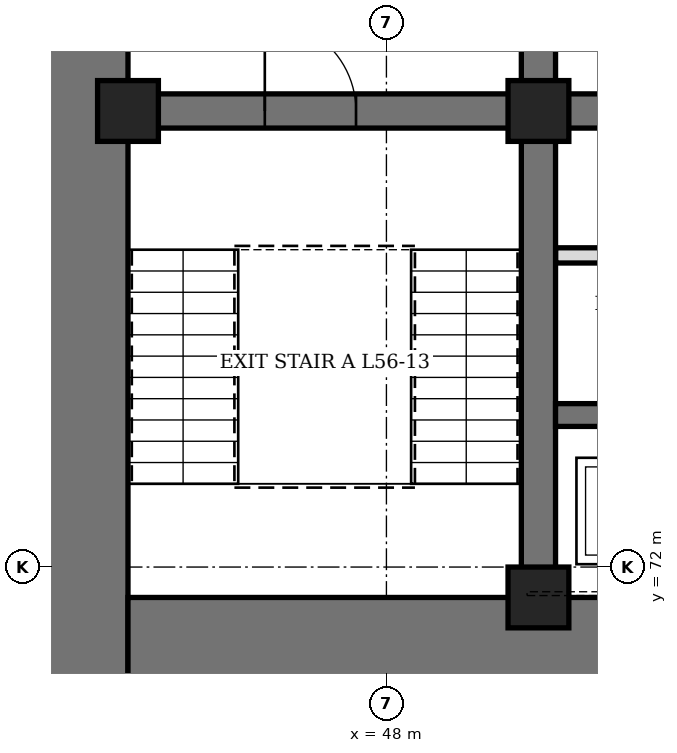
"""IFC4 building model, lengths in metres.
Left out: names, types, materials, properties, quantities, classifications, styles, units other than length and angle.
Written with IfcOpenShell. Run it as: python <this file> out.ifc"""

import sys

from ifc_helpers import new_model, si_unit, direction, frame, frame_2d, origin, origin_2d, place, context, subcontext, project, spatial, rectangle, hollow_rectangle, extrude, element, fill, save


model = new_model("IFC4")
c1 = context("Model", 3, precision=1e-05, world=origin(), true_north=direction((0.0, 1.0)))
c2 = subcontext(c1, "Body", "Model", "MODEL_VIEW")
j1 = project(units=[si_unit("LENGTHUNIT", "METRE"), si_unit("PLANEANGLEUNIT", "RADIAN")], contexts=[c1])
p1 = place(None, origin())
s1 = spatial("IfcSite", under=j1, at=p1, CompositionType="ELEMENT")
p2 = place(p1, origin())
s2 = spatial("IfcBuilding", under=s1, at=p2, CompositionType="ELEMENT")
p3 = place(p2, frame((0.0, 0.0, 250.3)))
s3 = spatial("IfcBuildingStorey", under=s2, at=p3, CompositionType="ELEMENT", Elevation=250.3)
p4 = place(p3, frame((44.0, 70.4, 0.0), z_axis=(0.0, 0.0, 1.0), x_axis=(0.0, 1.0, 0.0)))
e1 = element("IfcWall", 1, at=p4, inside=s3, PredefinedType="SHEAR", context=c2, shape_type="SweptSolid", body=[
    extrude(rectangle(XDim=19.2, YDim=1.2, at=frame_2d((9.6, 0.0))), origin(), (0.0, 0.0, 1.0), 4.2),
])
p5 = place(p4, frame((8.6, 0.0, 0.0)))
e2 = element("IfcOpeningElement", 2, at=p5, cuts=e1, PredefinedType="OPENING", context=c2, shape_type="SweptSolid", body=[
    extrude(rectangle(XDim=2.0, YDim=2.4, at=frame_2d((1.0, 1.2))), frame((0.0, 0.61, 0.0), z_axis=(0.0, -1.0, 0.0), x_axis=(1.0, 0.0, 0.0)), (0.0, 0.0, 1.0), 1.22),
])
p6 = place(p3, frame((44.6, 71.0, 0.0), z_axis=(0.0, 0.0, 1.0), x_axis=(1.0, 0.0, 0.0)))
e3 = element("IfcWall", 3, at=p6, inside=s3, PredefinedType="SHEAR", context=c2, shape_type="SweptSolid", body=[
    extrude(rectangle(XDim=22.8, YDim=1.2, at=frame_2d((11.4, 0.0))), origin(), (0.0, 0.0, 1.0), 4.2),
])
p7 = place(p6, frame((6.35, 0.0, 0.0)))
e4 = element("IfcOpeningElement", 4, at=p7, cuts=e3, PredefinedType="OPENING", context=c2, shape_type="SweptSolid", body=[
    extrude(rectangle(XDim=1.1, YDim=2.2, at=frame_2d((0.55, 1.1))), frame((0.0, 0.61, 0.0), z_axis=(0.0, -1.0, 0.0), x_axis=(1.0, 0.0, 0.0)), (0.0, 0.0, 1.0), 1.22),
])
p8 = place(p6, frame((9.35, 0.0, 0.0)))
e5 = element("IfcOpeningElement", 5, at=p8, cuts=e3, PredefinedType="OPENING", context=c2, shape_type="SweptSolid", body=[
    extrude(rectangle(XDim=1.1, YDim=2.2, at=frame_2d((0.55, 1.1))), frame((0.0, 0.61, 0.0), z_axis=(0.0, -1.0, 0.0), x_axis=(1.0, 0.0, 0.0)), (0.0, 0.0, 1.0), 1.22),
])
p9 = place(p6, frame((12.35, 0.0, 0.0)))
e6 = element("IfcOpeningElement", 6, at=p9, cuts=e3, PredefinedType="OPENING", context=c2, shape_type="SweptSolid", body=[
    extrude(rectangle(XDim=1.1, YDim=2.2, at=frame_2d((0.55, 1.1))), frame((0.0, 0.61, 0.0), z_axis=(0.0, -1.0, 0.0), x_axis=(1.0, 0.0, 0.0)), (0.0, 0.0, 1.0), 1.22),
])
p10 = place(p6, frame((15.35, 0.0, 0.0)))
e7 = element("IfcOpeningElement", 7, at=p10, cuts=e3, PredefinedType="OPENING", context=c2, shape_type="SweptSolid", body=[
    extrude(rectangle(XDim=1.1, YDim=2.2, at=frame_2d((0.55, 1.1))), frame((0.0, 0.61, 0.0), z_axis=(0.0, -1.0, 0.0), x_axis=(1.0, 0.0, 0.0)), (0.0, 0.0, 1.0), 1.22),
])
p11 = place(p3, frame((50.0, 71.6, 0.0), z_axis=(0.0, 0.0, 1.0), x_axis=(0.0, 1.0, 0.0)))
e8 = element("IfcWall", 8, at=p11, inside=s3, PredefinedType="SHEAR", context=c2, shape_type="SweptSolid", body=[
    extrude(rectangle(XDim=16.8, YDim=0.45, at=frame_2d((8.4, 0.0))), origin(), (0.0, 0.0, 1.0), 4.2),
])
p12 = place(p11, frame((7.5, 0.0, 0.0)))
e9 = element("IfcOpeningElement", 9, at=p12, cuts=e8, PredefinedType="OPENING", context=c2, shape_type="SweptSolid", body=[
    extrude(rectangle(XDim=1.8, YDim=2.4, at=frame_2d((0.9, 1.2))), frame((0.0, 0.235, 0.0), z_axis=(0.0, -1.0, 0.0), x_axis=(1.0, 0.0, 0.0)), (0.0, 0.0, 1.0), 0.47),
])
p13 = place(p3, frame((44.6, 78.0, 0.0), z_axis=(0.0, 0.0, 1.0), x_axis=(1.0, 0.0, 0.0)))
e10 = element("IfcWall", 10, at=p13, inside=s3, PredefinedType="SHEAR", context=c2, shape_type="SweptSolid", body=[
    extrude(rectangle(XDim=5.175, YDim=0.45, at=frame_2d((2.587, 0.0))), origin(), (0.0, 0.0, 1.0), 4.2),
])
p14 = place(p13, frame((1.8, 0.0, 0.0)))
e11 = element("IfcOpeningElement", 11, at=p14, cuts=e10, PredefinedType="OPENING", context=c2, shape_type="SweptSolid", body=[
    extrude(rectangle(XDim=1.2, YDim=2.1, at=frame_2d((0.6, 1.05))), frame((0.0, 0.235, 0.0), z_axis=(0.0, -1.0, 0.0), x_axis=(1.0, 0.0, 0.0)), (0.0, 0.0, 1.0), 0.47),
])
p15 = place(p3, frame((50.225, 78.0, 0.0), z_axis=(0.0, 0.0, 1.0), x_axis=(1.0, 0.0, 0.0)))
e12 = element("IfcWall", 12, at=p15, inside=s3, PredefinedType="SHEAR", context=c2, shape_type="SweptSolid", body=[
    extrude(rectangle(XDim=11.55, YDim=0.45, at=frame_2d((5.775, 0.0))), origin(), (0.0, 0.0, 1.0), 4.2),
])
p16 = place(p15, frame((0.825, 0.0, 0.0)))
e13 = element("IfcOpeningElement", 13, at=p16, cuts=e12, PredefinedType="OPENING", context=c2, shape_type="SweptSolid", body=[
    extrude(rectangle(XDim=0.9, YDim=2.1, at=frame_2d((0.45, 1.05))), frame((0.0, 0.235, 0.0), z_axis=(0.0, -1.0, 0.0), x_axis=(1.0, 0.0, 0.0)), (0.0, 0.0, 1.0), 0.47),
])
p17 = place(p15, frame((3.825, 0.0, 0.0)))
e14 = element("IfcOpeningElement", 14, at=p17, cuts=e12, PredefinedType="OPENING", context=c2, shape_type="SweptSolid", body=[
    extrude(rectangle(XDim=0.9, YDim=2.1, at=frame_2d((0.45, 1.05))), frame((0.0, 0.235, 0.0), z_axis=(0.0, -1.0, 0.0), x_axis=(1.0, 0.0, 0.0)), (0.0, 0.0, 1.0), 0.47),
])
p18 = place(p15, frame((6.825, 0.0, 0.0)))
e15 = element("IfcOpeningElement", 15, at=p18, cuts=e12, PredefinedType="OPENING", context=c2, shape_type="SweptSolid", body=[
    extrude(rectangle(XDim=0.9, YDim=2.1, at=frame_2d((0.45, 1.05))), frame((0.0, 0.235, 0.0), z_axis=(0.0, -1.0, 0.0), x_axis=(1.0, 0.0, 0.0)), (0.0, 0.0, 1.0), 0.47),
])
p19 = place(p15, frame((9.825, 0.0, 0.0)))
e16 = element("IfcOpeningElement", 16, at=p19, cuts=e12, PredefinedType="OPENING", context=c2, shape_type="SweptSolid", body=[
    extrude(rectangle(XDim=0.9, YDim=2.1, at=frame_2d((0.45, 1.05))), frame((0.0, 0.235, 0.0), z_axis=(0.0, -1.0, 0.0), x_axis=(1.0, 0.0, 0.0)), (0.0, 0.0, 1.0), 0.47),
])
p20 = place(p3, frame((50.225, 74.0, 0.0), z_axis=(0.0, 0.0, 1.0), x_axis=(1.0, 0.0, 0.0)))
e17 = element("IfcWall", 17, at=p20, inside=s3, PredefinedType="SHEAR", context=c2, shape_type="SweptSolid", body=[
    extrude(rectangle(XDim=11.55, YDim=0.3, at=frame_2d((5.775, 0.0))), origin(), (0.0, 0.0, 1.0), 4.2),
])
for number, where, z_axis, x_axis in (
    (18, (44.6, 78.0, 0.0), (0.0, 0.0, 1.0), (1.0, 0.0, 0.0)),
    (19, (50.0, 71.6, 0.0), (0.0, 0.0, 1.0), (1.0, 0.0, 0.0)),
    (20, (50.0, 78.0, 0.0), (0.0, 0.0, 1.0), (1.0, 0.0, 0.0)),
):
    element("IfcColumn", number, at=place(p3, frame(where, z_axis=z_axis, x_axis=x_axis)), inside=s3, PredefinedType="COLUMN", context=c2, shape_type="SweptSolid", body=[
        extrude(hollow_rectangle(XDim=0.8, YDim=0.8, WallThickness=0.1, at=origin_2d()), origin(), (0.0, 0.0, 1.0), 4.2),
    ])
p21 = place(p3, frame((50.225, 76.1, 0.0), z_axis=(0.0, 0.0, 1.0), x_axis=(1.0, 0.0, 0.0)))
e21 = element("IfcWall", 21, at=p21, inside=s3, PredefinedType="PARTITIONING", context=c2, shape_type="SweptSolid", body=[
    extrude(rectangle(XDim=2.55, YDim=0.2, at=frame_2d((1.275, 0.0))), origin(), (0.0, 0.0, 1.0), 4.04),
])
p22 = place(p21, frame((0.825, 0.0, 0.0)))
e22 = element("IfcOpeningElement", 22, at=p22, cuts=e21, PredefinedType="OPENING", context=c2, shape_type="SweptSolid", body=[
    extrude(rectangle(XDim=0.9, YDim=2.1, at=frame_2d((0.45, 1.05))), frame((0.0, 0.11, 0.0), z_axis=(0.0, -1.0, 0.0), x_axis=(1.0, 0.0, 0.0)), (0.0, 0.0, 1.0), 0.22),
])
p23 = place(p14, origin())
e23 = element("IfcDoor", 23, at=p23, inside=s3, OperationType="SINGLE_SWING_LEFT", PredefinedType="DOOR", context=c2, shape_type="SweptSolid", body=[
    extrude(rectangle(XDim=1.2, YDim=2.1, at=frame_2d((0.6, 1.05))), frame((0.0, 0.225, 0.0), z_axis=(0.0, -1.0, 0.0), x_axis=(1.0, 0.0, 0.0)), (0.0, 0.0, 1.0), 0.449),
])
fill(e11, e23)
save(model, sys.argv[1])
